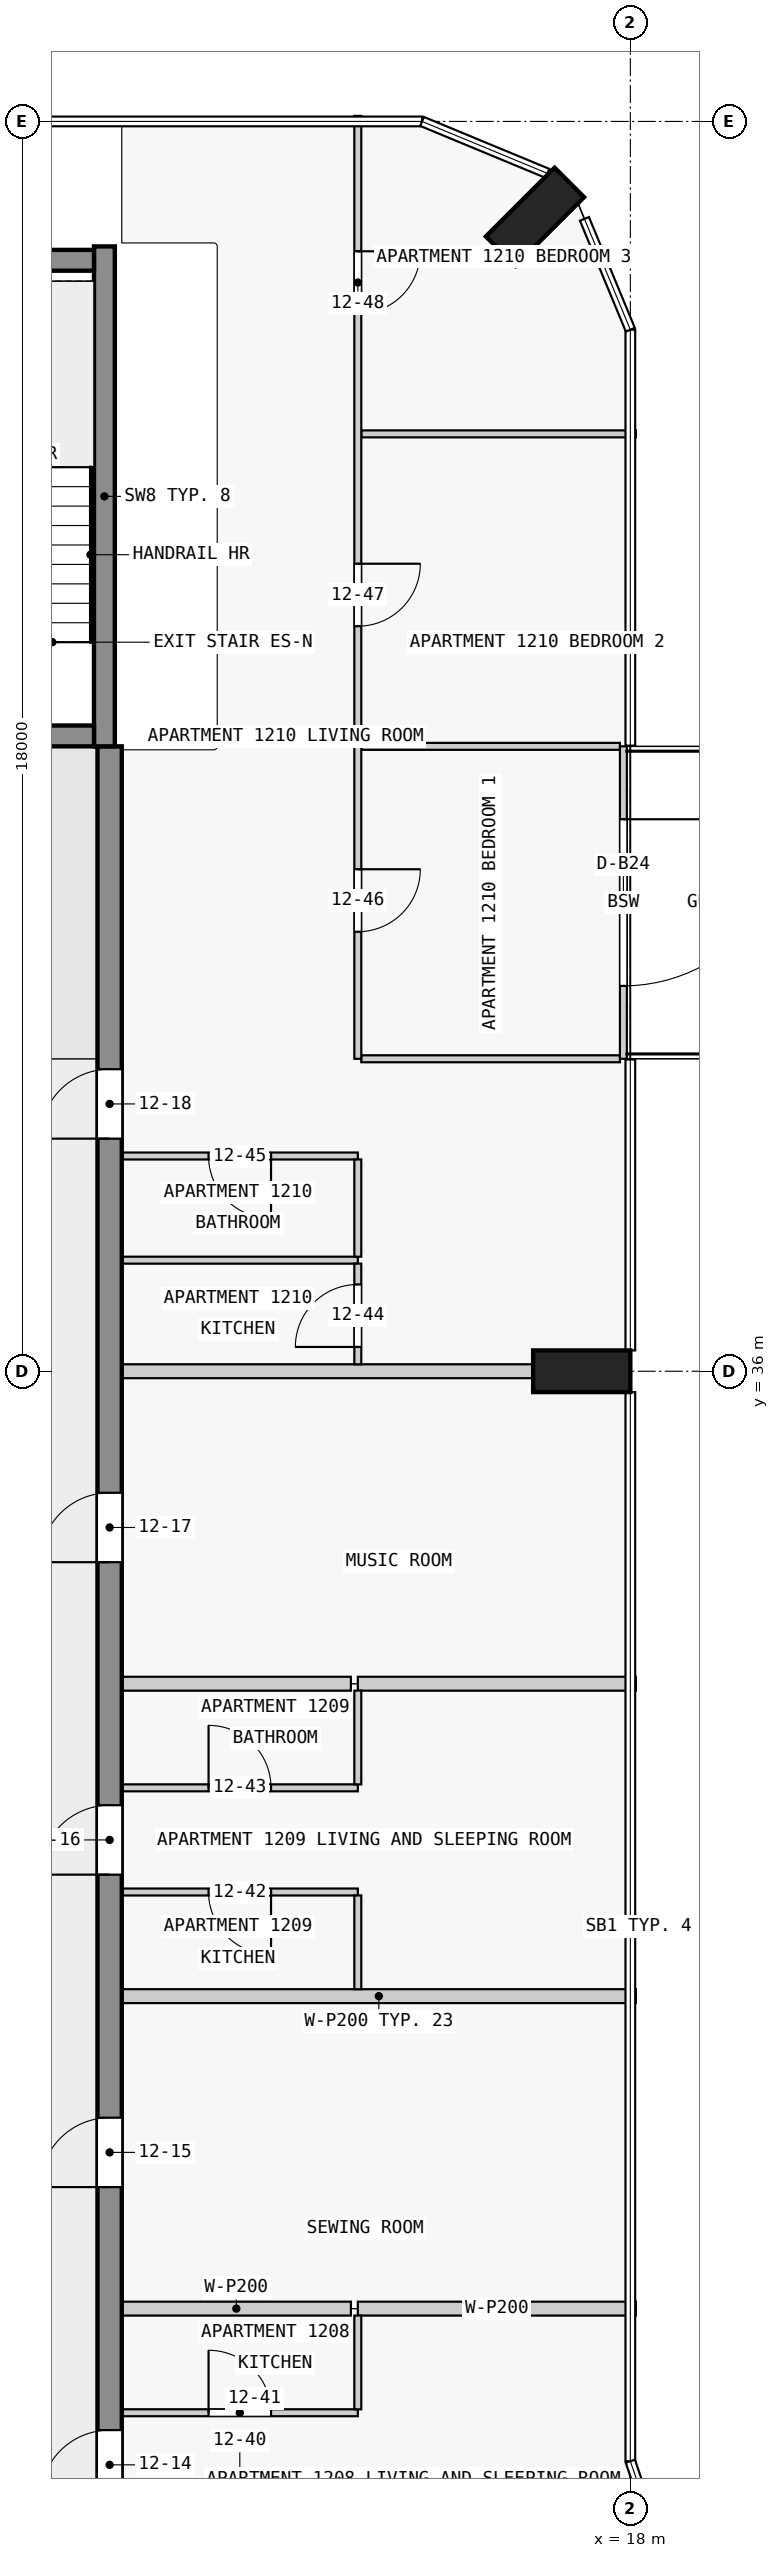
"""IFC4 building model, lengths in metres.
Left out: names, types, materials, properties, quantities, classifications, styles, units other than length and angle.
Written with IfcOpenShell. Run it as: python <this file> out.ifc"""

import sys

from ifc_helpers import new_model, si_unit, direction, frame, frame_2d, origin, origin_2d, place, context, subcontext, project, spatial, rectangle, extrude, element, fill, save


model = new_model("IFC4")
c1 = context("Model", 3, precision=1e-05, world=origin(), true_north=direction((0.0, 1.0)))
c2 = subcontext(c1, "Body", "Model", "MODEL_VIEW")
j1 = project(units=[si_unit("LENGTHUNIT", "METRE"), si_unit("PLANEANGLEUNIT", "RADIAN")], contexts=[c1])
p1 = place(None, origin())
s1 = spatial("IfcSite", under=j1, at=p1, CompositionType="ELEMENT")
p2 = place(p1, origin())
s2 = spatial("IfcBuilding", under=s1, at=p2, CompositionType="ELEMENT")
p3 = place(p2, frame((0.0, 0.0, 51.3)))
s3 = spatial("IfcBuildingStorey", under=s2, at=p3, CompositionType="ELEMENT", Elevation=51.3)
for number, where, z_axis, x_axis in (
    (1, (17.3, 36.0, 0.0), (0.0, 0.0, 1.0), (0.0, 1.0, 0.0)),
    (2, (16.626, 52.626, 0.0), (0.0, 0.0, 1.0), (-0.707, 0.707, 0.0)),
):
    element("IfcColumn", number, at=place(p3, frame(where, z_axis=z_axis, x_axis=x_axis)), inside=s3, PredefinedType="COLUMN", context=c2, shape_type="SweptSolid", body=[
        extrude(rectangle(XDim=0.6, YDim=1.4, at=origin_2d()), origin(), (0.0, 0.0, 1.0), 3.5),
    ])
p4 = place(p3, frame((7.725, 45.15, 0.0), z_axis=(0.0, 0.0, 1.0), x_axis=(1.0, 0.0, 0.0)))
e3 = element("IfcWall", 3, at=p4, inside=s3, PredefinedType="SHEAR", context=c2, shape_type="SweptSolid", body=[
    extrude(rectangle(XDim=2.55, YDim=0.3, at=frame_2d((1.275, 0.0))), origin(), (0.0, 0.0, 1.0), 3.5),
])
p5 = place(p4, frame((0.725, 0.0, 0.0)))
e4 = element("IfcOpeningElement", 4, at=p5, cuts=e3, PredefinedType="OPENING", context=c2, shape_type="SweptSolid", body=[
    extrude(rectangle(XDim=1.1, YDim=2.1, at=frame_2d((0.55, 1.05))), frame((0.0, 0.16, 0.0), z_axis=(0.0, -1.0, 0.0), x_axis=(1.0, 0.0, 0.0)), (0.0, 0.0, 1.0), 0.32),
])
p6 = place(p3, frame((7.725, 52.0, 0.0), z_axis=(0.0, 0.0, 1.0), x_axis=(1.0, 0.0, 0.0)))
e5 = element("IfcWall", 5, at=p6, inside=s3, PredefinedType="SHEAR", context=c2, shape_type="SweptSolid", body=[
    extrude(rectangle(XDim=2.55, YDim=0.3, at=frame_2d((1.275, 0.0))), origin(), (0.0, 0.0, 1.0), 3.5),
])
p7 = place(p3, frame((10.425, 45.0, 0.0), z_axis=(0.0, 0.0, 1.0), x_axis=(0.0, 1.0, 0.0)))
e6 = element("IfcWall", 6, at=p7, inside=s3, PredefinedType="SHEAR", context=c2, shape_type="SweptSolid", body=[
    extrude(rectangle(XDim=7.2, YDim=0.3, at=frame_2d((3.6, 0.0))), origin(), (0.0, 0.0, 1.0), 3.5),
])
p8 = place(p3, frame((10.5, 18.0, 0.0), z_axis=(0.0, 0.0, 1.0), x_axis=(0.0, 1.0, 0.0)))
e7 = element("IfcWall", 7, at=p8, inside=s3, PredefinedType="SHEAR", context=c2, shape_type="SweptSolid", body=[
    extrude(rectangle(XDim=27.0, YDim=0.35, at=frame_2d((13.5, 0.0))), origin(), (0.0, 0.0, 1.0), 3.25),
])
p9 = place(p8, frame((1.75, 0.0, 0.0)))
e8 = element("IfcOpeningElement", 8, at=p9, cuts=e7, PredefinedType="OPENING", context=c2, shape_type="SweptSolid", body=[
    extrude(rectangle(XDim=1.0, YDim=2.1, at=frame_2d((0.5, 1.05))), frame((0.0, 0.185, 0.0), z_axis=(0.0, -1.0, 0.0), x_axis=(1.0, 0.0, 0.0)), (0.0, 0.0, 1.0), 0.37),
])
p10 = place(p8, frame((6.25, 0.0, 0.0)))
e9 = element("IfcOpeningElement", 9, at=p10, cuts=e7, PredefinedType="OPENING", context=c2, shape_type="SweptSolid", body=[
    extrude(rectangle(XDim=1.0, YDim=2.1, at=frame_2d((0.5, 1.05))), frame((0.0, 0.185, 0.0), z_axis=(0.0, -1.0, 0.0), x_axis=(1.0, 0.0, 0.0)), (0.0, 0.0, 1.0), 0.37),
])
p11 = place(p8, frame((10.75, 0.0, 0.0)))
e10 = element("IfcOpeningElement", 10, at=p11, cuts=e7, PredefinedType="OPENING", context=c2, shape_type="SweptSolid", body=[
    extrude(rectangle(XDim=1.0, YDim=2.1, at=frame_2d((0.5, 1.05))), frame((0.0, 0.185, 0.0), z_axis=(0.0, -1.0, 0.0), x_axis=(1.0, 0.0, 0.0)), (0.0, 0.0, 1.0), 0.37),
])
p12 = place(p8, frame((15.25, 0.0, 0.0)))
e11 = element("IfcOpeningElement", 11, at=p12, cuts=e7, PredefinedType="OPENING", context=c2, shape_type="SweptSolid", body=[
    extrude(rectangle(XDim=1.0, YDim=2.1, at=frame_2d((0.5, 1.05))), frame((0.0, 0.185, 0.0), z_axis=(0.0, -1.0, 0.0), x_axis=(1.0, 0.0, 0.0)), (0.0, 0.0, 1.0), 0.37),
])
p13 = place(p8, frame((21.35, 0.0, 0.0)))
e12 = element("IfcOpeningElement", 12, at=p13, cuts=e7, PredefinedType="OPENING", context=c2, shape_type="SweptSolid", body=[
    extrude(rectangle(XDim=1.0, YDim=2.1, at=frame_2d((0.5, 1.05))), frame((0.0, 0.185, 0.0), z_axis=(0.0, -1.0, 0.0), x_axis=(1.0, 0.0, 0.0)), (0.0, 0.0, 1.0), 0.37),
])
p14 = place(p3, frame((17.9, 45.0, 0.0), z_axis=(0.0, 0.0, 1.0), x_axis=(0.0, -1.0, 0.0)))
e13 = element("IfcWall", 13, at=p14, inside=s3, PredefinedType="STANDARD", context=c2, shape_type="SweptSolid", body=[
    extrude(rectangle(XDim=4.5, YDim=0.1, at=frame_2d((2.25, 0.0))), origin(), (0.0, 0.0, 1.0), 3.25),
])
p15 = place(p14, frame((1.05, 0.0, 0.0)))
e14 = element("IfcOpeningElement", 14, at=p15, cuts=e13, PredefinedType="OPENING", context=c2, shape_type="SweptSolid", body=[
    extrude(rectangle(XDim=2.4, YDim=2.4, at=frame_2d((1.2, 1.2))), frame((0.0, 0.06, 0.0), z_axis=(0.0, -1.0, 0.0), x_axis=(1.0, 0.0, 0.0)), (0.0, 0.0, 1.0), 0.12),
])
p16 = place(p3, frame((10.675, 21.0, 0.0), z_axis=(0.0, 0.0, 1.0), x_axis=(1.0, 0.0, 0.0)))
e15 = element("IfcWall", 15, at=p16, inside=s3, PredefinedType="PARTITIONING", context=c2, shape_type="SweptSolid", body=[
    extrude(rectangle(XDim=3.4, YDim=0.1, at=frame_2d((1.7, 0.0))), origin(), (0.0, 0.0, 1.0), 3.25),
])
p17 = place(p16, frame((1.25, 0.0, 0.0)))
e16 = element("IfcOpeningElement", 16, at=p17, cuts=e15, PredefinedType="OPENING", context=c2, shape_type="SweptSolid", body=[
    extrude(rectangle(XDim=0.9, YDim=2.1, at=frame_2d((0.45, 1.05))), frame((0.0, 0.06, 0.0), z_axis=(0.0, -1.0, 0.0), x_axis=(1.0, 0.0, 0.0)), (0.0, 0.0, 1.0), 0.12),
])
p18 = place(p3, frame((13.975, 22.5, 0.0), z_axis=(0.0, 0.0, 1.0), x_axis=(-1.0, 0.0, 0.0)))
e17 = element("IfcWall", 17, at=p18, inside=s3, PredefinedType="PARTITIONING", context=c2, shape_type="SweptSolid", body=[
    extrude(rectangle(XDim=3.3, YDim=0.2, at=frame_2d((1.65, 0.0))), origin(), (0.0, 0.0, 1.0), 3.25),
])
p19 = place(p3, frame((14.075, 22.5, 0.0), z_axis=(0.0, 0.0, 1.0), x_axis=(1.0, 0.0, 0.0)))
e18 = element("IfcWall", 18, at=p19, inside=s3, PredefinedType="PARTITIONING", context=c2, shape_type="SweptSolid", body=[
    extrude(rectangle(XDim=4.005, YDim=0.2, at=frame_2d((2.002, 0.0))), origin(), (0.0, 0.0, 1.0), 3.25),
])
p20 = place(p3, frame((18.08, 27.0, 0.0), z_axis=(0.0, 0.0, 1.0), x_axis=(-1.0, 0.0, 0.0)))
e19 = element("IfcWall", 19, at=p20, inside=s3, PredefinedType="PARTITIONING", context=c2, shape_type="SweptSolid", body=[
    extrude(rectangle(XDim=7.405, YDim=0.2, at=frame_2d((3.703, 0.0))), origin(), (0.0, 0.0, 1.0), 3.25),
])
p21 = place(p3, frame((14.075, 28.5, 0.0), z_axis=(0.0, 0.0, 1.0), x_axis=(-1.0, 0.0, 0.0)))
e20 = element("IfcWall", 20, at=p21, inside=s3, PredefinedType="PARTITIONING", context=c2, shape_type="SweptSolid", body=[
    extrude(rectangle(XDim=3.4, YDim=0.1, at=frame_2d((1.7, 0.0))), origin(), (0.0, 0.0, 1.0), 3.25),
])
p22 = place(p21, frame((1.25, 0.0, 0.0)))
e21 = element("IfcOpeningElement", 21, at=p22, cuts=e20, PredefinedType="OPENING", context=c2, shape_type="SweptSolid", body=[
    extrude(rectangle(XDim=0.9, YDim=2.1, at=frame_2d((0.45, 1.05))), frame((0.0, 0.06, 0.0), z_axis=(0.0, -1.0, 0.0), x_axis=(1.0, 0.0, 0.0)), (0.0, 0.0, 1.0), 0.12),
])
p23 = place(p3, frame((10.675, 30.0, 0.0), z_axis=(0.0, 0.0, 1.0), x_axis=(1.0, 0.0, 0.0)))
e22 = element("IfcWall", 22, at=p23, inside=s3, PredefinedType="PARTITIONING", context=c2, shape_type="SweptSolid", body=[
    extrude(rectangle(XDim=3.4, YDim=0.1, at=frame_2d((1.7, 0.0))), origin(), (0.0, 0.0, 1.0), 3.25),
])
p24 = place(p23, frame((1.25, 0.0, 0.0)))
e23 = element("IfcOpeningElement", 23, at=p24, cuts=e22, PredefinedType="OPENING", context=c2, shape_type="SweptSolid", body=[
    extrude(rectangle(XDim=0.9, YDim=2.1, at=frame_2d((0.45, 1.05))), frame((0.0, 0.06, 0.0), z_axis=(0.0, -1.0, 0.0), x_axis=(1.0, 0.0, 0.0)), (0.0, 0.0, 1.0), 0.12),
])
p25 = place(p3, frame((13.975, 31.5, 0.0), z_axis=(0.0, 0.0, 1.0), x_axis=(-1.0, 0.0, 0.0)))
e24 = element("IfcWall", 24, at=p25, inside=s3, PredefinedType="PARTITIONING", context=c2, shape_type="SweptSolid", body=[
    extrude(rectangle(XDim=3.3, YDim=0.2, at=frame_2d((1.65, 0.0))), origin(), (0.0, 0.0, 1.0), 3.25),
])
p26 = place(p3, frame((14.075, 31.5, 0.0), z_axis=(0.0, 0.0, 1.0), x_axis=(1.0, 0.0, 0.0)))
e25 = element("IfcWall", 25, at=p26, inside=s3, PredefinedType="PARTITIONING", context=c2, shape_type="SweptSolid", body=[
    extrude(rectangle(XDim=4.005, YDim=0.2, at=frame_2d((2.002, 0.0))), origin(), (0.0, 0.0, 1.0), 3.25),
])
p27 = place(p3, frame((16.6, 36.0, 0.0), z_axis=(0.0, 0.0, 1.0), x_axis=(-1.0, 0.0, 0.0)))
e26 = element("IfcWall", 26, at=p27, inside=s3, PredefinedType="PARTITIONING", context=c2, shape_type="SweptSolid", body=[
    extrude(rectangle(XDim=5.925, YDim=0.2, at=frame_2d((2.962, 0.0))), origin(), (0.0, 0.0, 1.0), 3.25),
])
p28 = place(p3, frame((14.075, 37.6, 0.0), z_axis=(0.0, 0.0, 1.0), x_axis=(-1.0, 0.0, 0.0)))
e27 = element("IfcWall", 27, at=p28, inside=s3, PredefinedType="PARTITIONING", context=c2, shape_type="SweptSolid", body=[
    extrude(rectangle(XDim=3.4, YDim=0.1, at=frame_2d((1.7, 0.0))), origin(), (0.0, 0.0, 1.0), 3.25),
])
p29 = place(p3, frame((14.075, 39.1, 0.0), z_axis=(0.0, 0.0, 1.0), x_axis=(-1.0, 0.0, 0.0)))
e28 = element("IfcWall", 28, at=p29, inside=s3, PredefinedType="PARTITIONING", context=c2, shape_type="SweptSolid", body=[
    extrude(rectangle(XDim=3.4, YDim=0.1, at=frame_2d((1.7, 0.0))), origin(), (0.0, 0.0, 1.0), 3.25),
])
p30 = place(p29, frame((1.25, 0.0, 0.0)))
e29 = element("IfcOpeningElement", 29, at=p30, cuts=e28, PredefinedType="OPENING", context=c2, shape_type="SweptSolid", body=[
    extrude(rectangle(XDim=0.9, YDim=2.1, at=frame_2d((0.45, 1.05))), frame((0.0, 0.06, 0.0), z_axis=(0.0, -1.0, 0.0), x_axis=(1.0, 0.0, 0.0)), (0.0, 0.0, 1.0), 0.12),
])
for number, where, z_axis, x_axis in (
    (30, (14.125, 40.5, 0.0), (0.0, 0.0, 1.0), (1.0, 0.0, 0.0)),
    (31, (17.85, 45.0, 0.0), (0.0, 0.0, 1.0), (-1.0, 0.0, 0.0)),
):
    element("IfcWall", number, at=place(p3, frame(where, z_axis=z_axis, x_axis=x_axis)), inside=s3, PredefinedType="PARTITIONING", context=c2, shape_type="SweptSolid", body=[
        extrude(rectangle(XDim=3.725, YDim=0.1, at=frame_2d((1.863, 0.0))), origin(), (0.0, 0.0, 1.0), 3.25),
    ])
p31 = place(p3, frame((18.08, 49.5, 0.0), z_axis=(0.0, 0.0, 1.0), x_axis=(-1.0, 0.0, 0.0)))
e32 = element("IfcWall", 32, at=p31, inside=s3, PredefinedType="PARTITIONING", context=c2, shape_type="SweptSolid", body=[
    extrude(rectangle(XDim=3.955, YDim=0.1, at=frame_2d((1.978, 0.0))), origin(), (0.0, 0.0, 1.0), 3.25),
])
p32 = place(p3, frame((14.075, 54.08, 0.0), z_axis=(0.0, 0.0, 1.0), x_axis=(0.0, -1.0, 0.0)))
e33 = element("IfcWall", 33, at=p32, inside=s3, PredefinedType="PARTITIONING", context=c2, shape_type="SweptSolid", body=[
    extrude(rectangle(XDim=13.58, YDim=0.1, at=frame_2d((6.79, 0.0))), origin(), (0.0, 0.0, 1.0), 3.25),
])
p33 = place(p32, frame((10.85, 0.0, 0.0)))
e34 = element("IfcOpeningElement", 34, at=p33, cuts=e33, PredefinedType="OPENING", context=c2, shape_type="SweptSolid", body=[
    extrude(rectangle(XDim=0.9, YDim=2.1, at=frame_2d((0.45, 1.05))), frame((0.0, 0.06, 0.0), z_axis=(0.0, -1.0, 0.0), x_axis=(1.0, 0.0, 0.0)), (0.0, 0.0, 1.0), 0.12),
])
p34 = place(p32, frame((6.45, 0.0, 0.0)))
e35 = element("IfcOpeningElement", 35, at=p34, cuts=e33, PredefinedType="OPENING", context=c2, shape_type="SweptSolid", body=[
    extrude(rectangle(XDim=0.9, YDim=2.1, at=frame_2d((0.45, 1.05))), frame((0.0, 0.06, 0.0), z_axis=(0.0, -1.0, 0.0), x_axis=(1.0, 0.0, 0.0)), (0.0, 0.0, 1.0), 0.12),
])
p35 = place(p32, frame((1.95, 0.0, 0.0)))
e36 = element("IfcOpeningElement", 36, at=p35, cuts=e33, PredefinedType="OPENING", context=c2, shape_type="SweptSolid", body=[
    extrude(rectangle(XDim=0.9, YDim=2.1, at=frame_2d((0.45, 1.05))), frame((0.0, 0.06, 0.0), z_axis=(0.0, -1.0, 0.0), x_axis=(1.0, 0.0, 0.0)), (0.0, 0.0, 1.0), 0.12),
])
for number, where, z_axis, x_axis in (
    (37, (14.075, 21.05, 0.0), (0.0, 0.0, 1.0), (0.0, 1.0, 0.0)),
    (38, (14.075, 27.1, 0.0), (0.0, 0.0, 1.0), (0.0, 1.0, 0.0)),
    (39, (14.075, 30.05, 0.0), (0.0, 0.0, 1.0), (0.0, 1.0, 0.0)),
):
    element("IfcWall", number, at=place(p3, frame(where, z_axis=z_axis, x_axis=x_axis)), inside=s3, PredefinedType="PARTITIONING", context=c2, shape_type="SweptSolid", body=[
        extrude(rectangle(XDim=1.35, YDim=0.1, at=frame_2d((0.675, 0.0))), origin(), (0.0, 0.0, 1.0), 3.25),
    ])
p36 = place(p3, frame((14.075, 36.1, 0.0), z_axis=(0.0, 0.0, 1.0), x_axis=(0.0, 1.0, 0.0)))
e40 = element("IfcWall", 40, at=p36, inside=s3, PredefinedType="PARTITIONING", context=c2, shape_type="SweptSolid", body=[
    extrude(rectangle(XDim=1.45, YDim=0.1, at=frame_2d((0.725, 0.0))), origin(), (0.0, 0.0, 1.0), 3.25),
])
p37 = place(p36, frame((0.25, 0.0, 0.0)))
e41 = element("IfcOpeningElement", 41, at=p37, cuts=e40, PredefinedType="OPENING", context=c2, shape_type="SweptSolid", body=[
    extrude(rectangle(XDim=0.9, YDim=2.1, at=frame_2d((0.45, 1.05))), frame((0.0, 0.06, 0.0), z_axis=(0.0, -1.0, 0.0), x_axis=(1.0, 0.0, 0.0)), (0.0, 0.0, 1.0), 0.12),
])
p38 = place(p3, frame((14.075, 37.65, 0.0), z_axis=(0.0, 0.0, 1.0), x_axis=(0.0, 1.0, 0.0)))
e42 = element("IfcWall", 42, at=p38, inside=s3, PredefinedType="PARTITIONING", context=c2, shape_type="SweptSolid", body=[
    extrude(rectangle(XDim=1.4, YDim=0.1, at=frame_2d((0.7, 0.0))), origin(), (0.0, 0.0, 1.0), 3.25),
])
p39 = place(p15, origin())
e43 = element("IfcDoor", 43, at=p39, inside=s3, OperationType="SINGLE_SWING_LEFT", PredefinedType="DOOR", context=c2, shape_type="SweptSolid", body=[
    extrude(rectangle(XDim=2.4, YDim=2.4, at=frame_2d((1.2, 1.2))), frame((0.0, 0.025, 0.0), z_axis=(0.0, -1.0, 0.0), x_axis=(1.0, 0.0, 0.0)), (0.0, 0.0, 1.0), 0.05),
])
fill(e14, e43)
p40 = place(p9, origin())
e44 = element("IfcDoor", 44, at=p40, inside=s3, OperationType="SINGLE_SWING_LEFT", PredefinedType="DOOR", context=c2, shape_type="SweptSolid", body=[
    extrude(rectangle(XDim=1.0, YDim=2.1, at=frame_2d((0.5, 1.05))), frame((0.0, 0.025, 0.0), z_axis=(0.0, -1.0, 0.0), x_axis=(1.0, 0.0, 0.0)), (0.0, 0.0, 1.0), 0.05),
])
fill(e8, e44)
p41 = place(p10, origin())
e45 = element("IfcDoor", 45, at=p41, inside=s3, OperationType="SINGLE_SWING_LEFT", PredefinedType="DOOR", context=c2, shape_type="SweptSolid", body=[
    extrude(rectangle(XDim=1.0, YDim=2.1, at=frame_2d((0.5, 1.05))), frame((0.0, 0.025, 0.0), z_axis=(0.0, -1.0, 0.0), x_axis=(1.0, 0.0, 0.0)), (0.0, 0.0, 1.0), 0.05),
])
fill(e9, e45)
p42 = place(p11, origin())
e46 = element("IfcDoor", 46, at=p42, inside=s3, OperationType="SINGLE_SWING_LEFT", PredefinedType="DOOR", context=c2, shape_type="SweptSolid", body=[
    extrude(rectangle(XDim=1.0, YDim=2.1, at=frame_2d((0.5, 1.05))), frame((0.0, 0.025, 0.0), z_axis=(0.0, -1.0, 0.0), x_axis=(1.0, 0.0, 0.0)), (0.0, 0.0, 1.0), 0.05),
])
fill(e10, e46)
p43 = place(p12, origin())
e47 = element("IfcDoor", 47, at=p43, inside=s3, OperationType="SINGLE_SWING_RIGHT", PredefinedType="DOOR", context=c2, shape_type="SweptSolid", body=[
    extrude(rectangle(XDim=1.0, YDim=2.1, at=frame_2d((0.5, 1.05))), frame((0.0, 0.025, 0.0), z_axis=(0.0, -1.0, 0.0), x_axis=(1.0, 0.0, 0.0)), (0.0, 0.0, 1.0), 0.05),
])
fill(e11, e47)
p44 = place(p13, origin())
e48 = element("IfcDoor", 48, at=p44, inside=s3, OperationType="SINGLE_SWING_RIGHT", PredefinedType="DOOR", context=c2, shape_type="SweptSolid", body=[
    extrude(rectangle(XDim=1.0, YDim=2.1, at=frame_2d((0.5, 1.05))), frame((0.0, 0.025, 0.0), z_axis=(0.0, -1.0, 0.0), x_axis=(1.0, 0.0, 0.0)), (0.0, 0.0, 1.0), 0.05),
])
fill(e12, e48)
p45 = place(p17, origin())
e49 = element("IfcDoor", 49, at=p45, inside=s3, OperationType="SINGLE_SWING_RIGHT", PredefinedType="DOOR", context=c2, shape_type="SweptSolid", body=[
    extrude(rectangle(XDim=0.9, YDim=2.1, at=frame_2d((0.45, 1.05))), frame((0.0, 0.025, 0.0), z_axis=(0.0, -1.0, 0.0), x_axis=(1.0, 0.0, 0.0)), (0.0, 0.0, 1.0), 0.05),
])
fill(e16, e49)
p46 = place(p22, origin())
e50 = element("IfcDoor", 50, at=p46, inside=s3, OperationType="SINGLE_SWING_RIGHT", PredefinedType="DOOR", context=c2, shape_type="SweptSolid", body=[
    extrude(rectangle(XDim=0.9, YDim=2.1, at=frame_2d((0.45, 1.05))), frame((0.0, 0.025, 0.0), z_axis=(0.0, -1.0, 0.0), x_axis=(1.0, 0.0, 0.0)), (0.0, 0.0, 1.0), 0.05),
])
fill(e21, e50)
p47 = place(p24, origin())
e51 = element("IfcDoor", 51, at=p47, inside=s3, OperationType="SINGLE_SWING_RIGHT", PredefinedType="DOOR", context=c2, shape_type="SweptSolid", body=[
    extrude(rectangle(XDim=0.9, YDim=2.1, at=frame_2d((0.45, 1.05))), frame((0.0, 0.025, 0.0), z_axis=(0.0, -1.0, 0.0), x_axis=(1.0, 0.0, 0.0)), (0.0, 0.0, 1.0), 0.05),
])
fill(e23, e51)
p48 = place(p37, origin())
e52 = element("IfcDoor", 52, at=p48, inside=s3, OperationType="SINGLE_SWING_LEFT", PredefinedType="DOOR", context=c2, shape_type="SweptSolid", body=[
    extrude(rectangle(XDim=0.9, YDim=2.1, at=frame_2d((0.45, 1.05))), frame((0.0, 0.025, 0.0), z_axis=(0.0, -1.0, 0.0), x_axis=(1.0, 0.0, 0.0)), (0.0, 0.0, 1.0), 0.05),
])
fill(e41, e52)
p49 = place(p30, origin())
e53 = element("IfcDoor", 53, at=p49, inside=s3, OperationType="SINGLE_SWING_RIGHT", PredefinedType="DOOR", context=c2, shape_type="SweptSolid", body=[
    extrude(rectangle(XDim=0.9, YDim=2.1, at=frame_2d((0.45, 1.05))), frame((0.0, 0.025, 0.0), z_axis=(0.0, -1.0, 0.0), x_axis=(1.0, 0.0, 0.0)), (0.0, 0.0, 1.0), 0.05),
])
fill(e29, e53)
p50 = place(p33, origin())
e54 = element("IfcDoor", 54, at=p50, inside=s3, OperationType="SINGLE_SWING_RIGHT", PredefinedType="DOOR", context=c2, shape_type="SweptSolid", body=[
    extrude(rectangle(XDim=0.9, YDim=2.1, at=frame_2d((0.45, 1.05))), frame((0.0, 0.025, 0.0), z_axis=(0.0, -1.0, 0.0), x_axis=(1.0, 0.0, 0.0)), (0.0, 0.0, 1.0), 0.05),
])
fill(e34, e54)
p51 = place(p34, origin())
e55 = element("IfcDoor", 55, at=p51, inside=s3, OperationType="SINGLE_SWING_RIGHT", PredefinedType="DOOR", context=c2, shape_type="SweptSolid", body=[
    extrude(rectangle(XDim=0.9, YDim=2.1, at=frame_2d((0.45, 1.05))), frame((0.0, 0.025, 0.0), z_axis=(0.0, -1.0, 0.0), x_axis=(1.0, 0.0, 0.0)), (0.0, 0.0, 1.0), 0.05),
])
fill(e35, e55)
p52 = place(p35, origin())
e56 = element("IfcDoor", 56, at=p52, inside=s3, OperationType="SINGLE_SWING_LEFT", PredefinedType="DOOR", context=c2, shape_type="SweptSolid", body=[
    extrude(rectangle(XDim=0.9, YDim=2.1, at=frame_2d((0.45, 1.05))), frame((0.0, 0.025, 0.0), z_axis=(0.0, -1.0, 0.0), x_axis=(1.0, 0.0, 0.0)), (0.0, 0.0, 1.0), 0.05),
])
fill(e36, e56)
save(model, sys.argv[1])
